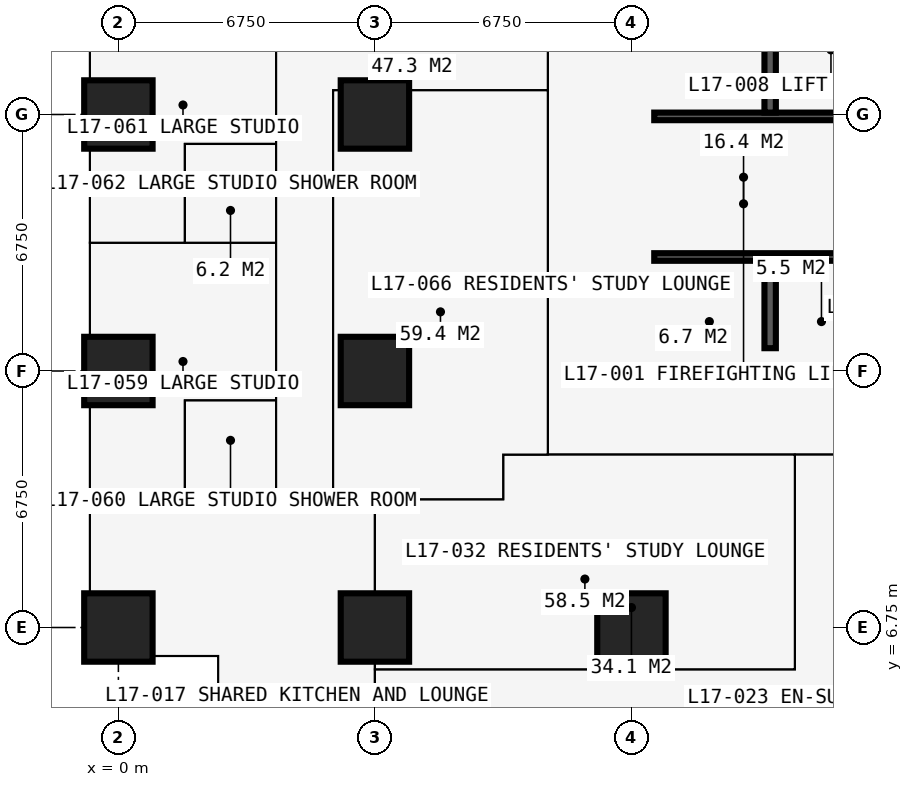
"""IFC4 building model, lengths in metres.
Left out: names, types, materials, properties, quantities, classifications, styles, units other than length and angle.
Written with IfcOpenShell. Run it as: python <this file> out.ifc"""

import sys

from ifc_helpers import new_model, si_unit, direction, frame, frame_2d, origin, origin_2d, place, context, subcontext, project, spatial, rectangle, extrude, element, fill, save


model = new_model("IFC4")
c1 = context("Model", 3, precision=1e-05, world=origin(), true_north=direction((0.0, 1.0)))
c2 = subcontext(c1, "Body", "Model", "MODEL_VIEW")
j1 = project(units=[si_unit("LENGTHUNIT", "METRE"), si_unit("PLANEANGLEUNIT", "RADIAN")], contexts=[c1])
p1 = place(None, origin())
s1 = spatial("IfcSite", under=j1, at=p1, CompositionType="ELEMENT")
p2 = place(p1, origin())
s2 = spatial("IfcBuilding", under=s1, at=p2, CompositionType="ELEMENT")
p3 = place(p2, frame((0.0, 0.0, 64.8)))
s3 = spatial("IfcBuildingStorey", under=s2, at=p3, CompositionType="ELEMENT", Elevation=64.8)
for number, where, z_axis, x_axis in (
    (1, (0.0, 6.75, 0.0), (0.0, 0.0, 1.0), (1.0, 0.0, 0.0)),
    (2, (0.0, 13.5, 0.0), (0.0, 0.0, 1.0), (1.0, 0.0, 0.0)),
    (3, (0.0, 20.25, 0.0), (0.0, 0.0, 1.0), (1.0, 0.0, 0.0)),
    (4, (6.75, 6.75, 0.0), (0.0, 0.0, 1.0), (1.0, 0.0, 0.0)),
    (5, (6.75, 13.5, 0.0), (0.0, 0.0, 1.0), (1.0, 0.0, 0.0)),
    (6, (6.75, 20.25, 0.0), (0.0, 0.0, 1.0), (1.0, 0.0, 0.0)),
    (7, (13.5, 6.75, 0.0), (0.0, 0.0, 1.0), (1.0, 0.0, 0.0)),
):
    element("IfcColumn", number, at=place(p3, frame(where, z_axis=z_axis, x_axis=x_axis)), inside=s3, PredefinedType="COLUMN", context=c2, shape_type="SweptSolid", body=[
        extrude(rectangle(XDim=1.8, YDim=1.8, at=origin_2d()), origin(), (0.0, 0.0, 1.0), 3.6),
    ])
p4 = place(p3, frame((12.9, 13.5, 0.0), z_axis=(0.0, 0.0, 1.0), x_axis=(1.0, 0.0, 0.0)))
e8 = element("IfcWall", 8, at=p4, inside=s3, PredefinedType="SHEAR", context=c2, shape_type="SweptSolid", body=[
    extrude(rectangle(XDim=14.7, YDim=1.2, at=frame_2d((7.35, 0.0))), origin(), (0.0, 0.0, 1.0), 3.6),
])
p5 = place(p3, frame((13.5, 26.4, 0.0), z_axis=(0.0, 0.0, 1.0), x_axis=(0.0, -1.0, 0.0)))
e9 = element("IfcWall", 9, at=p5, inside=s3, PredefinedType="SHEAR", context=c2, shape_type="SweptSolid", body=[
    extrude(rectangle(XDim=12.3, YDim=1.2, at=frame_2d((6.15, 0.0))), origin(), (0.0, 0.0, 1.0), 3.6),
])
p6 = place(p5, frame((7.45, 0.0, 0.0)))
e10 = element("IfcOpeningElement", 10, at=p6, cuts=e9, PredefinedType="OPENING", context=c2, shape_type="SweptSolid", body=[
    extrude(rectangle(XDim=1.2, YDim=2.2, at=frame_2d((0.6, 1.1))), frame((0.0, 0.61, 0.0), z_axis=(0.0, -1.0, 0.0), x_axis=(1.0, 0.0, 0.0)), (0.0, 0.0, 1.0), 1.22),
])
p7 = place(p3, frame((-0.75, 20.25, 0.0), z_axis=(0.0, 0.0, 1.0), x_axis=(0.0, 1.0, 0.0)))
e11 = element("IfcWall", 11, at=p7, inside=s3, PredefinedType="SOLIDWALL", context=c2, shape_type="SweptSolid", body=[
    extrude(rectangle(XDim=6.75, YDim=0.15, at=frame_2d((3.375, 0.0))), origin(), (0.0, 0.0, 1.0), 3.375),
])
p8 = place(p7, frame((0.962, 0.0, 0.0)))
e12 = element("IfcOpeningElement", 12, at=p8, cuts=e11, PredefinedType="OPENING", context=c2, shape_type="SweptSolid", body=[
    extrude(rectangle(XDim=1.0, YDim=2.2, at=frame_2d((0.5, 1.1))), frame((0.0, 0.085, 0.0), z_axis=(0.0, -1.0, 0.0), x_axis=(1.0, 0.0, 0.0)), (0.0, 0.0, 1.0), 0.17),
])
p9 = place(p7, frame((2.025, 0.0, 0.9)))
e13 = element("IfcOpeningElement", 13, at=p9, cuts=e11, PredefinedType="OPENING", context=c2, shape_type="SweptSolid", body=[
    extrude(rectangle(XDim=1.2, YDim=1.8, at=frame_2d((0.6, 0.9))), frame((0.0, 0.085, 0.0), z_axis=(0.0, -1.0, 0.0), x_axis=(1.0, 0.0, 0.0)), (0.0, 0.0, 1.0), 0.17),
])
p10 = place(p7, frame((4.788, 0.0, 0.0)))
e14 = element("IfcOpeningElement", 14, at=p10, cuts=e11, PredefinedType="OPENING", context=c2, shape_type="SweptSolid", body=[
    extrude(rectangle(XDim=1.0, YDim=2.2, at=frame_2d((0.5, 1.1))), frame((0.0, 0.085, 0.0), z_axis=(0.0, -1.0, 0.0), x_axis=(1.0, 0.0, 0.0)), (0.0, 0.0, 1.0), 0.17),
])
p11 = place(p7, frame((3.525, 0.0, 0.9)))
e15 = element("IfcOpeningElement", 15, at=p11, cuts=e11, PredefinedType="OPENING", context=c2, shape_type="SweptSolid", body=[
    extrude(rectangle(XDim=1.2, YDim=1.8, at=frame_2d((0.6, 0.9))), frame((0.0, 0.085, 0.0), z_axis=(0.0, -1.0, 0.0), x_axis=(1.0, 0.0, 0.0)), (0.0, 0.0, 1.0), 0.17),
])
p12 = place(p3, frame((-0.75, 6.0, 0.0), z_axis=(0.0, 0.0, 1.0), x_axis=(1.0, 0.0, 0.0)))
e16 = element("IfcWall", 16, at=p12, inside=s3, PredefinedType="SOLIDWALL", context=c2, shape_type="SweptSolid", body=[
    extrude(rectangle(XDim=3.375, YDim=0.3, at=frame_2d((1.688, 0.0))), origin(), (0.0, 0.0, 1.0), 3.375),
])
p13 = place(p12, frame((1.833, 0.0, 0.9)))
e17 = element("IfcOpeningElement", 17, at=p13, cuts=e16, PredefinedType="OPENING", context=c2, shape_type="SweptSolid", body=[
    extrude(rectangle(XDim=1.2, YDim=1.8, at=frame_2d((0.6, 0.9))), frame((0.0, 0.16, 0.0), z_axis=(0.0, -1.0, 0.0), x_axis=(1.0, 0.0, 0.0)), (0.0, 0.0, 1.0), 0.32),
])
p14 = place(p3, frame((2.625, 6.0, 0.0), z_axis=(0.0, 0.0, 1.0), x_axis=(0.0, -1.0, 0.0)))
e18 = element("IfcWall", 18, at=p14, inside=s3, PredefinedType="SOLIDWALL", context=c2, shape_type="SweptSolid", body=[
    extrude(rectangle(XDim=3.375, YDim=0.3, at=frame_2d((1.688, 0.0))), origin(), (0.0, 0.0, 1.0), 3.375),
])
p15 = place(p14, frame((0.788, 0.0, 0.6)))
e19 = element("IfcOpeningElement", 19, at=p15, cuts=e18, PredefinedType="OPENING", context=c2, shape_type="SweptSolid", body=[
    extrude(rectangle(XDim=1.8, YDim=2.1, at=frame_2d((0.9, 1.05))), frame((0.0, 0.16, 0.0), z_axis=(0.0, -1.0, 0.0), x_axis=(1.0, 0.0, 0.0)), (0.0, 0.0, 1.0), 0.32),
])
p16 = place(p3, frame((14.1, 16.5, 0.0), z_axis=(0.0, 0.0, 1.0), x_axis=(1.0, 0.0, 0.0)))
e20 = element("IfcWall", 20, at=p16, inside=s3, PredefinedType="SHEAR", context=c2, shape_type="SweptSolid", body=[
    extrude(rectangle(XDim=12.3, YDim=0.2, at=frame_2d((6.15, 0.0))), origin(), (0.0, 0.0, 1.0), 3.6),
])
p17 = place(p16, frame((0.9, 0.0, 0.0)))
e21 = element("IfcOpeningElement", 21, at=p17, cuts=e20, PredefinedType="OPENING", context=c2, shape_type="SweptSolid", body=[
    extrude(rectangle(XDim=1.1, YDim=2.2, at=frame_2d((0.55, 1.1))), frame((0.0, 0.11, 0.0), z_axis=(0.0, -1.0, 0.0), x_axis=(1.0, 0.0, 0.0)), (0.0, 0.0, 1.0), 0.22),
])
p18 = place(p16, frame((9.5, 0.0, 0.0)))
e22 = element("IfcOpeningElement", 22, at=p18, cuts=e20, PredefinedType="OPENING", context=c2, shape_type="SweptSolid", body=[
    extrude(rectangle(XDim=1.1, YDim=2.2, at=frame_2d((0.55, 1.1))), frame((0.0, 0.11, 0.0), z_axis=(0.0, -1.0, 0.0), x_axis=(1.0, 0.0, 0.0)), (0.0, 0.0, 1.0), 0.22),
])
p19 = place(p3, frame((14.1, 20.2, 0.0), z_axis=(0.0, 0.0, 1.0), x_axis=(1.0, 0.0, 0.0)))
e23 = element("IfcWall", 23, at=p19, inside=s3, PredefinedType="SHEAR", context=c2, shape_type="SweptSolid", body=[
    extrude(rectangle(XDim=12.3, YDim=0.2, at=frame_2d((6.15, 0.0))), origin(), (0.0, 0.0, 1.0), 3.6),
])
p20 = place(p19, frame((0.35, 0.0, 0.0)))
e24 = element("IfcOpeningElement", 24, at=p20, cuts=e23, PredefinedType="OPENING", context=c2, shape_type="SweptSolid", body=[
    extrude(rectangle(XDim=1.1, YDim=2.2, at=frame_2d((0.55, 1.1))), frame((0.0, 0.11, 0.0), z_axis=(0.0, -1.0, 0.0), x_axis=(1.0, 0.0, 0.0)), (0.0, 0.0, 1.0), 0.22),
])
p21 = place(p19, frame((9.75, 0.0, 0.0)))
e25 = element("IfcOpeningElement", 25, at=p21, cuts=e23, PredefinedType="OPENING", context=c2, shape_type="SweptSolid", body=[
    extrude(rectangle(XDim=1.1, YDim=2.2, at=frame_2d((0.55, 1.1))), frame((0.0, 0.11, 0.0), z_axis=(0.0, -1.0, 0.0), x_axis=(1.0, 0.0, 0.0)), (0.0, 0.0, 1.0), 0.22),
])
p22 = place(p3, frame((17.15, 20.3, 0.0), z_axis=(0.0, 0.0, 1.0), x_axis=(0.0, 1.0, 0.0)))
e26 = element("IfcWall", 26, at=p22, inside=s3, PredefinedType="SHEAR", context=c2, shape_type="SweptSolid", body=[
    extrude(rectangle(XDim=6.1, YDim=0.3, at=frame_2d((3.05, 0.0))), origin(), (0.0, 0.0, 1.0), 3.6),
])
p23 = place(p3, frame((17.15, 14.1, 0.0), z_axis=(0.0, 0.0, 1.0), x_axis=(0.0, 1.0, 0.0)))
e27 = element("IfcWall", 27, at=p23, inside=s3, PredefinedType="SHEAR", context=c2, shape_type="SweptSolid", body=[
    extrude(rectangle(XDim=2.3, YDim=0.3, at=frame_2d((1.15, 0.0))), origin(), (0.0, 0.0, 1.0), 3.6),
])
p24 = place(p3, frame((-0.734, 10.125, 0.0), z_axis=(0.0, 0.0, 1.0), x_axis=(1.0, 0.0, 0.0)))
e28 = element("IfcWall", 28, at=p24, inside=s3, PredefinedType="PARTITIONING", context=c2, shape_type="SweptSolid", body=[
    extrude(rectangle(XDim=10.859, YDim=0.15, at=frame_2d((5.429, 0.0))), origin(), (0.0, 0.0, 1.0), 3.375),
])
p25 = place(p3, frame((-0.734, 16.875, 0.0), z_axis=(0.0, 0.0, 1.0), x_axis=(1.0, 0.0, 0.0)))
e29 = element("IfcWall", 29, at=p25, inside=s3, PredefinedType="PARTITIONING", context=c2, shape_type="SweptSolid", body=[
    extrude(rectangle(XDim=4.884, YDim=0.175, at=frame_2d((2.442, 0.0))), origin(), (0.0, 0.0, 1.0), 3.375),
])
p26 = place(p25, frame((3.234, 0.0, 0.0)))
e30 = element("IfcOpeningElement", 30, at=p26, cuts=e29, PredefinedType="OPENING", context=c2, shape_type="SweptSolid", body=[
    extrude(rectangle(XDim=0.9, YDim=2.2, at=frame_2d((0.45, 1.1))), frame((0.0, 0.097, 0.0), z_axis=(0.0, -1.0, 0.0), x_axis=(1.0, 0.0, 0.0)), (0.0, 0.0, 1.0), 0.195),
])
p27 = place(p3, frame((1.75, 10.125, 0.0), z_axis=(0.0, 0.0, 1.0), x_axis=(0.0, 1.0, 0.0)))
e31 = element("IfcWall", 31, at=p27, inside=s3, PredefinedType="PARTITIONING", context=c2, shape_type="SweptSolid", body=[
    extrude(rectangle(XDim=2.6, YDim=0.1, at=frame_2d((1.3, 0.0))), origin(), (0.0, 0.0, 1.0), 3.375),
])
p28 = place(p27, frame((0.85, 0.0, 0.0)))
e32 = element("IfcOpeningElement", 32, at=p28, cuts=e31, PredefinedType="OPENING", context=c2, shape_type="SweptSolid", body=[
    extrude(rectangle(XDim=0.9, YDim=2.2, at=frame_2d((0.45, 1.1))), frame((0.0, 0.06, 0.0), z_axis=(0.0, -1.0, 0.0), x_axis=(1.0, 0.0, 0.0)), (0.0, 0.0, 1.0), 0.12),
])
p29 = place(p3, frame((1.75, 12.725, 0.0), z_axis=(0.0, 0.0, 1.0), x_axis=(1.0, 0.0, 0.0)))
e33 = element("IfcWall", 33, at=p29, inside=s3, PredefinedType="PARTITIONING", context=c2, shape_type="SweptSolid", body=[
    extrude(rectangle(XDim=2.4, YDim=0.1, at=frame_2d((1.2, 0.0))), origin(), (0.0, 0.0, 1.0), 3.375),
])
p30 = place(p3, frame((1.75, 16.875, 0.0), z_axis=(0.0, 0.0, 1.0), x_axis=(0.0, 1.0, 0.0)))
e34 = element("IfcWall", 34, at=p30, inside=s3, PredefinedType="PARTITIONING", context=c2, shape_type="SweptSolid", body=[
    extrude(rectangle(XDim=2.6, YDim=0.1, at=frame_2d((1.3, 0.0))), origin(), (0.0, 0.0, 1.0), 3.375),
])
p31 = place(p3, frame((1.75, 19.475, 0.0), z_axis=(0.0, 0.0, 1.0), x_axis=(1.0, 0.0, 0.0)))
e35 = element("IfcWall", 35, at=p31, inside=s3, PredefinedType="PARTITIONING", context=c2, shape_type="SweptSolid", body=[
    extrude(rectangle(XDim=2.4, YDim=0.1, at=frame_2d((1.2, 0.0))), origin(), (0.0, 0.0, 1.0), 3.375),
])
p32 = place(p3, frame((4.15, 10.125, 0.0), z_axis=(0.0, 0.0, 1.0), x_axis=(0.0, 1.0, 0.0)))
e36 = element("IfcWall", 36, at=p32, inside=s3, PredefinedType="PARTITIONING", context=c2, shape_type="SweptSolid", body=[
    extrude(rectangle(XDim=23.625, YDim=0.15, at=frame_2d((11.812, 0.0))), origin(), (0.0, 0.0, 1.0), 3.375),
])
p33 = place(p32, frame((4.2, 0.0, 0.0)))
e37 = element("IfcOpeningElement", 37, at=p33, cuts=e36, PredefinedType="OPENING", context=c2, shape_type="SweptSolid", body=[
    extrude(rectangle(XDim=0.95, YDim=2.2, at=frame_2d((0.475, 1.1))), frame((0.0, 0.085, 0.0), z_axis=(0.0, -1.0, 0.0), x_axis=(1.0, 0.0, 0.0)), (0.0, 0.0, 1.0), 0.17),
])
p34 = place(p32, frame((10.95, 0.0, 0.0)))
e38 = element("IfcOpeningElement", 38, at=p34, cuts=e36, PredefinedType="OPENING", context=c2, shape_type="SweptSolid", body=[
    extrude(rectangle(XDim=0.95, YDim=2.2, at=frame_2d((0.475, 1.1))), frame((0.0, 0.085, 0.0), z_axis=(0.0, -1.0, 0.0), x_axis=(1.0, 0.0, 0.0)), (0.0, 0.0, 1.0), 0.17),
])
p35 = place(p32, frame((17.7, 0.0, 0.0)))
e39 = element("IfcOpeningElement", 39, at=p35, cuts=e36, PredefinedType="OPENING", context=c2, shape_type="SweptSolid", body=[
    extrude(rectangle(XDim=0.95, YDim=2.2, at=frame_2d((0.475, 1.1))), frame((0.0, 0.085, 0.0), z_axis=(0.0, -1.0, 0.0), x_axis=(1.0, 0.0, 0.0)), (0.0, 0.0, 1.0), 0.17),
])
p36 = place(p3, frame((5.65, 10.125, 0.0), z_axis=(0.0, 0.0, 1.0), x_axis=(0.0, 1.0, 0.0)))
e40 = element("IfcWall", 40, at=p36, inside=s3, PredefinedType="PARTITIONING", context=c2, shape_type="SweptSolid", body=[
    extrude(rectangle(XDim=10.762, YDim=0.15, at=frame_2d((5.381, 0.0))), origin(), (0.0, 0.0, 1.0), 3.375),
])
p37 = place(p36, frame((4.9, 0.0, 0.0)))
e41 = element("IfcOpeningElement", 41, at=p37, cuts=e40, PredefinedType="OPENING", context=c2, shape_type="SweptSolid", body=[
    extrude(rectangle(XDim=0.95, YDim=2.2, at=frame_2d((0.475, 1.1))), frame((0.0, 0.085, 0.0), z_axis=(0.0, -1.0, 0.0), x_axis=(1.0, 0.0, 0.0)), (0.0, 0.0, 1.0), 0.17),
])
p38 = place(p3, frame((5.65, 20.887, 0.0), z_axis=(0.0, 0.0, 1.0), x_axis=(1.0, 0.0, 0.0)))
e42 = element("IfcWall", 42, at=p38, inside=s3, PredefinedType="PARTITIONING", context=c2, shape_type="SweptSolid", body=[
    extrude(rectangle(XDim=5.65, YDim=0.15, at=frame_2d((2.825, 0.0))), origin(), (0.0, 0.0, 1.0), 3.375),
])
p39 = place(p3, frame((6.75, 4.15, 0.0), z_axis=(0.0, 0.0, 1.0), x_axis=(0.0, 1.0, 0.0)))
e43 = element("IfcWall", 43, at=p39, inside=s3, PredefinedType="PARTITIONING", context=c2, shape_type="SweptSolid", body=[
    extrude(rectangle(XDim=5.975, YDim=0.15, at=frame_2d((2.988, 0.0))), origin(), (0.0, 0.0, 1.0), 2.877),
])
p40 = place(p3, frame((6.75, 5.65, 0.0), z_axis=(0.0, 0.0, 1.0), x_axis=(1.0, 0.0, 0.0)))
e44 = element("IfcWall", 44, at=p40, inside=s3, PredefinedType="PARTITIONING", context=c2, shape_type="SweptSolid", body=[
    extrude(rectangle(XDim=11.05, YDim=0.15, at=frame_2d((5.525, 0.0))), origin(), (0.0, 0.0, 1.0), 3.375),
])
p41 = place(p3, frame((10.125, 10.125, 0.0), z_axis=(0.0, 0.0, 1.0), x_axis=(0.0, 1.0, 0.0)))
e45 = element("IfcWall", 45, at=p41, inside=s3, PredefinedType="PARTITIONING", context=c2, shape_type="SweptSolid", body=[
    extrude(rectangle(XDim=1.175, YDim=0.15, at=frame_2d((0.587, 0.0))), origin(), (0.0, 0.0, 1.0), 3.375),
])
p42 = place(p3, frame((10.125, 11.3, 0.0), z_axis=(0.0, 0.0, 1.0), x_axis=(1.0, 0.0, 0.0)))
e46 = element("IfcWall", 46, at=p42, inside=s3, PredefinedType="PARTITIONING", context=c2, shape_type="SweptSolid", body=[
    extrude(rectangle(XDim=20.675, YDim=0.15, at=frame_2d((10.337, 0.0))), origin(), (0.0, 0.0, 1.0), 3.375),
])
p43 = place(p42, frame((8.375, 0.0, 0.0)))
e47 = element("IfcOpeningElement", 47, at=p43, cuts=e46, PredefinedType="OPENING", context=c2, shape_type="SweptSolid", body=[
    extrude(rectangle(XDim=1.0, YDim=2.2, at=frame_2d((0.5, 1.1))), frame((0.0, 0.085, 0.0), z_axis=(0.0, -1.0, 0.0), x_axis=(1.0, 0.0, 0.0)), (0.0, 0.0, 1.0), 0.17),
])
p44 = place(p42, frame((10.975, 0.0, 0.0)))
e48 = element("IfcOpeningElement", 48, at=p44, cuts=e46, PredefinedType="OPENING", context=c2, shape_type="SweptSolid", body=[
    extrude(rectangle(XDim=1.0, YDim=2.2, at=frame_2d((0.5, 1.1))), frame((0.0, 0.085, 0.0), z_axis=(0.0, -1.0, 0.0), x_axis=(1.0, 0.0, 0.0)), (0.0, 0.0, 1.0), 0.17),
])
p45 = place(p42, frame((3.925, 0.0, 0.0)))
e49 = element("IfcOpeningElement", 49, at=p45, cuts=e46, PredefinedType="OPENING", context=c2, shape_type="SweptSolid", body=[
    extrude(rectangle(XDim=0.95, YDim=2.2, at=frame_2d((0.475, 1.1))), frame((0.0, 0.085, 0.0), z_axis=(0.0, -1.0, 0.0), x_axis=(1.0, 0.0, 0.0)), (0.0, 0.0, 1.0), 0.17),
])
p46 = place(p3, frame((11.3, 11.3, 0.0), z_axis=(0.0, 0.0, 1.0), x_axis=(0.0, 1.0, 0.0)))
e50 = element("IfcWall", 50, at=p46, inside=s3, PredefinedType="PARTITIONING", context=c2, shape_type="SweptSolid", body=[
    extrude(rectangle(XDim=19.075, YDim=0.15, at=frame_2d((9.538, 0.0))), origin(), (0.0, 0.0, 1.0), 3.375),
])
p47 = place(p46, frame((10.137, 0.0, 0.0)))
e51 = element("IfcOpeningElement", 51, at=p47, cuts=e50, PredefinedType="OPENING", context=c2, shape_type="SweptSolid", body=[
    extrude(rectangle(XDim=1.0, YDim=2.2, at=frame_2d((0.5, 1.1))), frame((0.0, 0.085, 0.0), z_axis=(0.0, -1.0, 0.0), x_axis=(1.0, 0.0, 0.0)), (0.0, 0.0, 1.0), 0.17),
])
p48 = place(p3, frame((17.8, 5.65, 0.0), z_axis=(0.0, 0.0, 1.0), x_axis=(0.0, 1.0, 0.0)))
e52 = element("IfcWall", 52, at=p48, inside=s3, PredefinedType="PARTITIONING", context=c2, shape_type="SweptSolid", body=[
    extrude(rectangle(XDim=5.65, YDim=0.15, at=frame_2d((2.825, 0.0))), origin(), (0.0, 0.0, 1.0), 3.375),
])
p49 = place(p8, origin())
e53 = element("IfcDoor", 53, at=p49, inside=s3, OperationType="SINGLE_SWING_LEFT", PredefinedType="DOOR", context=c2, shape_type="SweptSolid", body=[
    extrude(rectangle(XDim=1.0, YDim=2.2, at=frame_2d((0.5, 1.1))), frame((0.0, 0.025, 0.0), z_axis=(0.0, -1.0, 0.0), x_axis=(1.0, 0.0, 0.0)), (0.0, 0.0, 1.0), 0.05),
])
fill(e12, e53)
p50 = place(p13, origin())
e54 = element("IfcWindow", 54, at=p50, inside=s3, PartitioningType="SINGLE_PANEL", PredefinedType="WINDOW", context=c2, shape_type="SweptSolid", body=[
    extrude(rectangle(XDim=1.2, YDim=1.8, at=frame_2d((0.6, 0.9))), frame((0.0, 0.03, 0.0), z_axis=(0.0, -1.0, 0.0), x_axis=(1.0, 0.0, 0.0)), (0.0, 0.0, 1.0), 0.06),
])
fill(e17, e54)
p51 = place(p15, origin())
e55 = element("IfcWindow", 55, at=p51, inside=s3, PartitioningType="SINGLE_PANEL", PredefinedType="WINDOW", context=c2, shape_type="SweptSolid", body=[
    extrude(rectangle(XDim=1.8, YDim=2.1, at=frame_2d((0.9, 1.05))), frame((0.0, 0.03, 0.0), z_axis=(0.0, -1.0, 0.0), x_axis=(1.0, 0.0, 0.0)), (0.0, 0.0, 1.0), 0.06),
])
fill(e19, e55)
p52 = place(p17, origin())
e56 = element("IfcDoor", 56, at=p52, inside=s3, OperationType="DOUBLE_DOOR_SLIDING", PredefinedType="DOOR", context=c2, shape_type="SweptSolid", body=[
    extrude(rectangle(XDim=1.1, YDim=2.2, at=frame_2d((0.55, 1.1))), frame((0.0, 0.025, 0.0), z_axis=(0.0, -1.0, 0.0), x_axis=(1.0, 0.0, 0.0)), (0.0, 0.0, 1.0), 0.05),
])
fill(e21, e56)
p53 = place(p6, origin())
e57 = element("IfcDoor", 57, at=p53, inside=s3, OperationType="DOUBLE_DOOR_SINGLE_SWING", PredefinedType="DOOR", context=c2, shape_type="SweptSolid", body=[
    extrude(rectangle(XDim=1.2, YDim=2.2, at=frame_2d((0.6, 1.1))), frame((0.0, 0.025, 0.0), z_axis=(0.0, -1.0, 0.0), x_axis=(1.0, 0.0, 0.0)), (0.0, 0.0, 1.0), 0.05),
])
fill(e10, e57)
p54 = place(p20, origin())
e58 = element("IfcDoor", 58, at=p54, inside=s3, OperationType="SINGLE_SWING_LEFT", PredefinedType="DOOR", context=c2, shape_type="SweptSolid", body=[
    extrude(rectangle(XDim=1.1, YDim=2.2, at=frame_2d((0.55, 1.1))), frame((0.0, 0.025, 0.0), z_axis=(0.0, -1.0, 0.0), x_axis=(1.0, 0.0, 0.0)), (0.0, 0.0, 1.0), 0.05),
])
fill(e24, e58)
p55 = place(p43, origin())
e59 = element("IfcDoor", 59, at=p55, inside=s3, OperationType="SINGLE_SWING_LEFT", PredefinedType="DOOR", context=c2, shape_type="SweptSolid", body=[
    extrude(rectangle(XDim=1.0, YDim=2.2, at=frame_2d((0.5, 1.1))), frame((0.0, 0.025, 0.0), z_axis=(0.0, -1.0, 0.0), x_axis=(1.0, 0.0, 0.0)), (0.0, 0.0, 1.0), 0.05),
])
fill(e47, e59)
p56 = place(p45, origin())
e60 = element("IfcDoor", 60, at=p56, inside=s3, OperationType="SINGLE_SWING_LEFT", PredefinedType="DOOR", context=c2, shape_type="SweptSolid", body=[
    extrude(rectangle(XDim=0.95, YDim=2.2, at=frame_2d((0.475, 1.1))), frame((0.0, 0.025, 0.0), z_axis=(0.0, -1.0, 0.0), x_axis=(1.0, 0.0, 0.0)), (0.0, 0.0, 1.0), 0.05),
])
fill(e49, e60)
p57 = place(p33, origin())
e61 = element("IfcDoor", 61, at=p57, inside=s3, OperationType="SINGLE_SWING_LEFT", PredefinedType="DOOR", context=c2, shape_type="SweptSolid", body=[
    extrude(rectangle(XDim=0.95, YDim=2.2, at=frame_2d((0.475, 1.1))), frame((0.0, 0.025, 0.0), z_axis=(0.0, -1.0, 0.0), x_axis=(1.0, 0.0, 0.0)), (0.0, 0.0, 1.0), 0.05),
])
fill(e37, e61)
p58 = place(p28, origin())
e62 = element("IfcDoor", 62, at=p58, inside=s3, OperationType="SINGLE_SWING_RIGHT", PredefinedType="DOOR", context=c2, shape_type="SweptSolid", body=[
    extrude(rectangle(XDim=0.9, YDim=2.2, at=frame_2d((0.45, 1.1))), frame((0.0, 0.025, 0.0), z_axis=(0.0, -1.0, 0.0), x_axis=(1.0, 0.0, 0.0)), (0.0, 0.0, 1.0), 0.05),
])
fill(e32, e62)
p59 = place(p34, origin())
e63 = element("IfcDoor", 63, at=p59, inside=s3, OperationType="SINGLE_SWING_LEFT", PredefinedType="DOOR", context=c2, shape_type="SweptSolid", body=[
    extrude(rectangle(XDim=0.95, YDim=2.2, at=frame_2d((0.475, 1.1))), frame((0.0, 0.025, 0.0), z_axis=(0.0, -1.0, 0.0), x_axis=(1.0, 0.0, 0.0)), (0.0, 0.0, 1.0), 0.05),
])
fill(e38, e63)
p60 = place(p26, origin())
e64 = element("IfcDoor", 64, at=p60, inside=s3, OperationType="SINGLE_SWING_RIGHT", PredefinedType="DOOR", context=c2, shape_type="SweptSolid", body=[
    extrude(rectangle(XDim=0.9, YDim=2.2, at=frame_2d((0.45, 1.1))), frame((0.0, 0.025, 0.0), z_axis=(0.0, -1.0, 0.0), x_axis=(1.0, 0.0, 0.0)), (0.0, 0.0, 1.0), 0.05),
])
fill(e30, e64)
p61 = place(p47, origin())
e65 = element("IfcDoor", 65, at=p61, inside=s3, OperationType="SINGLE_SWING_LEFT", PredefinedType="DOOR", context=c2, shape_type="SweptSolid", body=[
    extrude(rectangle(XDim=1.0, YDim=2.2, at=frame_2d((0.5, 1.1))), frame((0.0, 0.025, 0.0), z_axis=(0.0, -1.0, 0.0), x_axis=(1.0, 0.0, 0.0)), (0.0, 0.0, 1.0), 0.05),
])
fill(e51, e65)
p62 = place(p37, origin())
e66 = element("IfcDoor", 66, at=p62, inside=s3, OperationType="SINGLE_SWING_LEFT", PredefinedType="DOOR", context=c2, shape_type="SweptSolid", body=[
    extrude(rectangle(XDim=0.95, YDim=2.2, at=frame_2d((0.475, 1.1))), frame((0.0, 0.025, 0.0), z_axis=(0.0, -1.0, 0.0), x_axis=(1.0, 0.0, 0.0)), (0.0, 0.0, 1.0), 0.05),
])
fill(e41, e66)
save(model, sys.argv[1])
